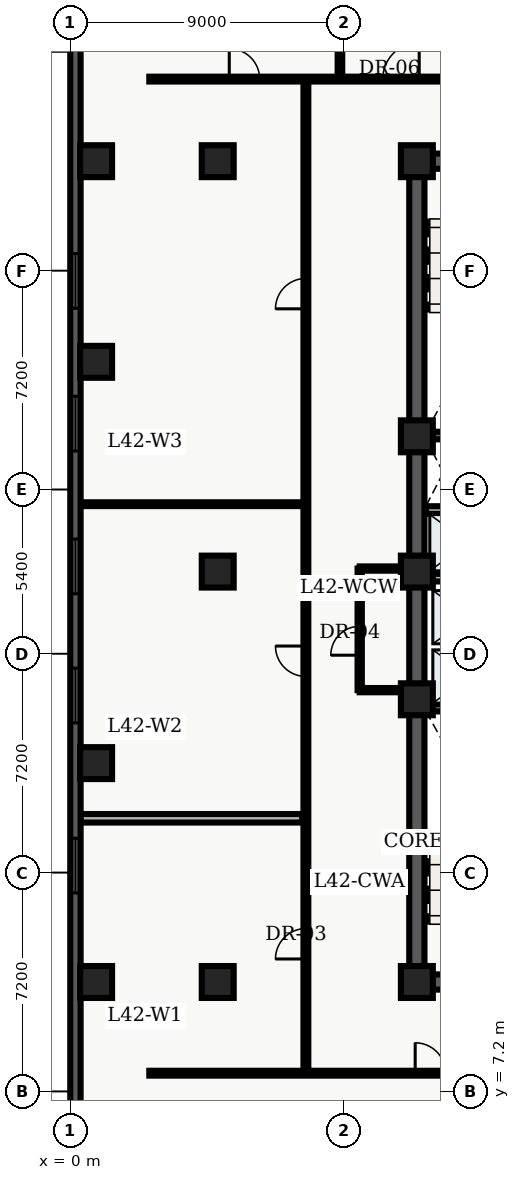
"""IFC4 building model, lengths in metres.
Left out: names, types, materials, properties, quantities, classifications, styles, units other than length and angle.
Written with IfcOpenShell. Run it as: python <this file> out.ifc"""

import sys

from ifc_helpers import new_model, entity, si_unit, converted_unit, direction, frame, origin_with_axes, origin_2d_with_axis, place, context, subcontext, project, spatial, polyline, rectangle, outline, extrude, element, fill, save


model = new_model("IFC4")
c1 = context("Model", 3, precision=1e-05, world=origin_with_axes(), true_north=direction((0.0, 1.0)))
c2 = subcontext(c1, "Body", "Model", "MODEL_VIEW")
j1 = project(units=[si_unit("LENGTHUNIT", "METRE"), converted_unit("PLANEANGLEUNIT", "DEGREE", entity("IfcPlaneAngleMeasure", 0.017), si_unit("PLANEANGLEUNIT", "RADIAN"), dimensions=[0, 0, 0, 0, 0, 0, 0])], contexts=[c1])
p1 = place(None, origin_with_axes())
s1 = spatial("IfcSite", under=j1, at=p1, CompositionType="ELEMENT")
p2 = place(p1, origin_with_axes())
s2 = spatial("IfcBuilding", under=s1, at=p2, CompositionType="ELEMENT")
p3 = place(p2, frame((0.0, 0.0, 171.9), z_axis=(0.0, 0.0, 1.0), x_axis=(1.0, 0.0, 0.0)))
s3 = spatial("IfcBuildingStorey", under=s2, at=p3, CompositionType="ELEMENT", Elevation=171.9)
p4 = place(p3, frame((11.4, 10.8, 0.0), z_axis=(0.0, 0.0, 1.0), x_axis=(0.0, 1.0, 0.0)))
e1 = element("IfcWall", 1, at=p4, inside=s3, PredefinedType="SHEAR", context=c2, shape_type="SweptSolid", body=[
    extrude(outline(polyline([(0.0, -0.25), (27.0, -0.25), (27.0, 0.25), (0.0, 0.25), (0.0, -0.25)])), origin_with_axes(), (0.0, 0.0, 1.0), 3.66),
])
p5 = place(p3, frame((11.4, 10.8, 0.0), z_axis=(0.0, 0.0, 1.0), x_axis=(1.0, 0.0, 0.0)))
e2 = element("IfcWall", 2, at=p5, inside=s3, PredefinedType="SHEAR", context=c2, shape_type="SweptSolid", body=[
    extrude(outline(polyline([(0.0, -0.25), (7.2, -0.25), (7.2, 0.25), (0.0, 0.25), (0.0, -0.25)])), origin_with_axes(), (0.0, 0.0, 1.0), 3.66),
])
p6 = place(p5, frame((2.625, 0.0, 0.0), z_axis=(0.0, 0.0, 1.0), x_axis=(1.0, 0.0, 0.0)))
e3 = element("IfcOpeningElement", 3, at=p6, cuts=e2, PredefinedType="OPENING", context=c2, shape_type="SweptSolid", body=[
    extrude(rectangle(XDim=1.05, YDim=0.52, at=origin_2d_with_axis()), origin_with_axes(), (0.0, 0.0, 1.0), 2.15),
])
p7 = place(p3, frame((11.4, 37.8, 0.0), z_axis=(0.0, 0.0, 1.0), x_axis=(1.0, 0.0, 0.0)))
e4 = element("IfcWall", 4, at=p7, inside=s3, PredefinedType="SHEAR", context=c2, shape_type="SweptSolid", body=[
    extrude(outline(polyline([(0.0, -0.25), (7.2, -0.25), (7.2, 0.25), (0.0, 0.25), (0.0, -0.25)])), origin_with_axes(), (0.0, 0.0, 1.0), 3.66),
])
p8 = place(p7, frame((2.625, 0.0, 0.0), z_axis=(0.0, 0.0, 1.0), x_axis=(1.0, 0.0, 0.0)))
e5 = element("IfcOpeningElement", 5, at=p8, cuts=e4, PredefinedType="OPENING", context=c2, shape_type="SweptSolid", body=[
    extrude(rectangle(XDim=1.05, YDim=0.52, at=origin_2d_with_axis()), origin_with_axes(), (0.0, 0.0, 1.0), 2.15),
])
for number, where, z_axis, x_axis in (
    (6, (11.65, 19.825, 0.0), (0.0, 0.0, 1.0), (1.0, 0.0, 0.0)),
    (7, (11.65, 28.775, 0.0), (0.0, 0.0, 1.0), (1.0, 0.0, 0.0)),
):
    element("IfcWall", number, at=place(p3, frame(where, z_axis=z_axis, x_axis=x_axis)), inside=s3, PredefinedType="SHEAR", context=c2, shape_type="SweptSolid", body=[
        extrude(outline(polyline([(0.0, -0.125), (6.7, -0.125), (6.7, 0.125), (0.0, 0.125), (0.0, -0.125)])), origin_with_axes(), (0.0, 0.0, 1.0), 3.66),
    ])
p9 = place(p3, frame((11.7, 24.1, 0.0), z_axis=(0.0, 0.0, 1.0), x_axis=(1.0, 0.0, 0.0)))
e8 = element("IfcWall", 8, at=p9, inside=s3, PredefinedType="SOLIDWALL", context=c2, shape_type="SweptSolid", body=[
    extrude(outline(polyline([(0.0, -0.125), (6.6, -0.125), (6.6, 0.125), (0.0, 0.125), (0.0, -0.125)])), origin_with_axes(), (0.0, 0.0, 1.0), 2.7),
])
p10 = place(p9, frame((3.6, 0.0, 0.0), z_axis=(0.0, 0.0, 1.0), x_axis=(1.0, 0.0, 0.0)))
e9 = element("IfcOpeningElement", 9, at=p10, cuts=e8, PredefinedType="OPENING", context=c2, shape_type="SweptSolid", body=[
    extrude(rectangle(XDim=0.9, YDim=0.27, at=origin_2d_with_axis()), origin_with_axes(), (0.0, 0.0, 1.0), 2.15),
])
p11 = place(p9, frame((5.65, 0.0, 0.0), z_axis=(0.0, 0.0, 1.0), x_axis=(1.0, 0.0, 0.0)))
e10 = element("IfcOpeningElement", 10, at=p11, cuts=e8, PredefinedType="OPENING", context=c2, shape_type="SweptSolid", body=[
    extrude(rectangle(XDim=0.9, YDim=0.27, at=origin_2d_with_axis()), origin_with_axes(), (0.0, 0.0, 1.0), 2.15),
])
p12 = place(p3, frame((11.7, 26.325, 0.0), z_axis=(0.0, 0.0, 1.0), x_axis=(1.0, 0.0, 0.0)))
e11 = element("IfcWall", 11, at=p12, inside=s3, PredefinedType="SOLIDWALL", context=c2, shape_type="SweptSolid", body=[
    extrude(outline(polyline([(0.0, -0.125), (6.6, -0.125), (6.6, 0.125), (0.0, 0.125), (0.0, -0.125)])), origin_with_axes(), (0.0, 0.0, 1.0), 2.7),
])
p13 = place(p12, frame((3.5, 0.0, 0.0), z_axis=(0.0, 0.0, 1.0), x_axis=(1.0, 0.0, 0.0)))
e12 = element("IfcOpeningElement", 12, at=p13, cuts=e11, PredefinedType="OPENING", context=c2, shape_type="SweptSolid", body=[
    extrude(rectangle(XDim=0.9, YDim=0.27, at=origin_2d_with_axis()), origin_with_axes(), (0.0, 0.0, 1.0), 2.15),
])
for number, where, z_axis, x_axis in (
    (13, (11.4, 10.8, 0.0), (0.0, 0.0, 1.0), (1.0, 0.0, 0.0)),
    (14, (11.4, 20.1, 0.0), (0.0, 0.0, 1.0), (1.0, 0.0, 0.0)),
    (15, (11.4, 24.3, 0.0), (0.0, 0.0, 1.0), (1.0, 0.0, 0.0)),
    (16, (11.4, 28.75, 0.0), (0.0, 0.0, 1.0), (1.0, 0.0, 0.0)),
    (17, (11.4, 37.8, 0.0), (0.0, 0.0, 1.0), (1.0, 0.0, 0.0)),
    (18, (4.85, 10.8, 0.0), (0.0, 0.0, 1.0), (1.0, 0.0, 0.0)),
    (19, (4.85, 24.3, 0.0), (0.0, 0.0, 1.0), (1.0, 0.0, 0.0)),
    (20, (4.85, 37.8, 0.0), (0.0, 0.0, 1.0), (1.0, 0.0, 0.0)),
    (21, (0.85, 10.8, 0.0), (0.0, 0.0, 1.0), (1.0, 0.0, 0.0)),
    (22, (0.85, 18.0, 0.0), (0.0, 0.0, 1.0), (1.0, 0.0, 0.0)),
    (23, (0.85, 31.2, 0.0), (0.0, 0.0, 1.0), (1.0, 0.0, 0.0)),
    (24, (0.85, 37.8, 0.0), (0.0, 0.0, 1.0), (1.0, 0.0, 0.0)),
):
    element("IfcColumn", number, at=place(p3, frame(where, z_axis=z_axis, x_axis=x_axis)), inside=s3, PredefinedType="COLUMN", context=c2, shape_type="SweptSolid", body=[
        extrude(rectangle(XDim=1.05, YDim=1.05, at=origin_2d_with_axis()), origin_with_axes(), (0.0, 0.0, 1.0), 3.9),
    ])
p14 = place(p3, frame((9.52, 20.4, 0.0), z_axis=(0.0, 0.0, 1.0), x_axis=(0.0, 1.0, 0.0)))
e25 = element("IfcWall", 25, at=p14, inside=s3, PredefinedType="PARTITIONING", context=c2, shape_type="SweptSolid", body=[
    extrude(outline(polyline([(0.0, -0.07), (4.0, -0.07), (4.0, 0.07), (0.0, 0.07), (0.0, -0.07)])), origin_with_axes(), (0.0, 0.0, 1.0), 2.7),
])
p15 = place(p14, frame((1.625, 0.0, 0.0), z_axis=(0.0, 0.0, 1.0), x_axis=(1.0, 0.0, 0.0)))
e26 = element("IfcOpeningElement", 26, at=p15, cuts=e25, PredefinedType="OPENING", context=c2, shape_type="SweptSolid", body=[
    extrude(rectangle(XDim=0.95, YDim=0.16, at=origin_2d_with_axis()), origin_with_axes(), (0.0, 0.0, 1.0), 2.15),
])
for number, where, z_axis, x_axis in (
    (27, (9.52, 20.4, 0.0), (0.0, 0.0, 1.0), (1.0, 0.0, 0.0)),
    (28, (9.52, 24.4, 0.0), (0.0, 0.0, 1.0), (1.0, 0.0, 0.0)),
):
    element("IfcWall", number, at=place(p3, frame(where, z_axis=z_axis, x_axis=x_axis)), inside=s3, PredefinedType="PARTITIONING", context=c2, shape_type="SweptSolid", body=[
        extrude(outline(polyline([(0.0, -0.07), (1.58, -0.07), (1.58, 0.07), (0.0, 0.07), (0.0, -0.07)])), origin_with_axes(), (0.0, 0.0, 1.0), 2.7),
    ])
p16 = place(p3, frame((2.6, 7.8, 0.0), z_axis=(0.0, 0.0, 1.0), x_axis=(1.0, 0.0, 0.0)))
e29 = element("IfcWall", 29, at=p16, inside=s3, PredefinedType="PARTITIONING", context=c2, shape_type="SweptSolid", body=[
    extrude(outline(polyline([(0.0, -0.08), (18.55, -0.08), (18.55, 0.08), (0.0, 0.08), (0.0, -0.08)])), origin_with_axes(), (0.0, 0.0, 1.0), 2.7),
])
p17 = place(p16, frame((9.245, 0.0, 0.0), z_axis=(0.0, 0.0, 1.0), x_axis=(1.0, 0.0, 0.0)))
e30 = element("IfcOpeningElement", 30, at=p17, cuts=e29, PredefinedType="OPENING", context=c2, shape_type="SweptSolid", body=[
    extrude(rectangle(XDim=1.0, YDim=0.18, at=origin_2d_with_axis()), origin_with_axes(), (0.0, 0.0, 1.0), 2.15),
])
p18 = place(p3, frame((2.6, 40.5, 0.0), z_axis=(0.0, 0.0, 1.0), x_axis=(1.0, 0.0, 0.0)))
e31 = element("IfcWall", 31, at=p18, inside=s3, PredefinedType="PARTITIONING", context=c2, shape_type="SweptSolid", body=[
    extrude(outline(polyline([(0.0, -0.08), (21.803, -0.08), (21.803, 0.08), (0.0, 0.08), (0.0, -0.08)])), origin_with_axes(), (0.0, 0.0, 1.0), 2.7),
])
p19 = place(p18, frame((3.13, 0.0, 0.0), z_axis=(0.0, 0.0, 1.0), x_axis=(1.0, 0.0, 0.0)))
e32 = element("IfcOpeningElement", 32, at=p19, cuts=e31, PredefinedType="OPENING", context=c2, shape_type="SweptSolid", body=[
    extrude(rectangle(XDim=1.0, YDim=0.18, at=origin_2d_with_axis()), origin_with_axes(), (0.0, 0.0, 1.0), 2.15),
])
p20 = place(p18, frame((8.277, 0.0, 0.0), z_axis=(0.0, 0.0, 1.0), x_axis=(1.0, 0.0, 0.0)))
e33 = element("IfcOpeningElement", 33, at=p20, cuts=e31, PredefinedType="OPENING", context=c2, shape_type="SweptSolid", body=[
    extrude(rectangle(XDim=1.2, YDim=0.18, at=origin_2d_with_axis()), origin_with_axes(), (0.0, 0.0, 1.0), 2.2),
])
p21 = place(p18, frame((15.553, 0.0, 0.0), z_axis=(0.0, 0.0, 1.0), x_axis=(1.0, 0.0, 0.0)))
e34 = element("IfcOpeningElement", 34, at=p21, cuts=e31, PredefinedType="OPENING", context=c2, shape_type="SweptSolid", body=[
    extrude(rectangle(XDim=1.0, YDim=0.18, at=origin_2d_with_axis()), origin_with_axes(), (0.0, 0.0, 1.0), 2.15),
])
p22 = place(p3, frame((7.75, 7.8, 0.0), z_axis=(0.0, 0.0, 1.0), x_axis=(0.0, 1.0, 0.0)))
e35 = element("IfcWall", 35, at=p22, inside=s3, PredefinedType="PARTITIONING", context=c2, shape_type="SweptSolid", body=[
    extrude(outline(polyline([(0.0, -0.08), (32.7, -0.08), (32.7, 0.08), (0.0, 0.08), (0.0, -0.08)])), origin_with_axes(), (0.0, 0.0, 1.0), 2.7),
])
p23 = place(p22, frame((4.258, 0.0, 0.0), z_axis=(0.0, 0.0, 1.0), x_axis=(1.0, 0.0, 0.0)))
e36 = element("IfcOpeningElement", 36, at=p23, cuts=e35, PredefinedType="OPENING", context=c2, shape_type="SweptSolid", body=[
    extrude(rectangle(XDim=1.0, YDim=0.18, at=origin_2d_with_axis()), origin_with_axes(), (0.0, 0.0, 1.0), 2.15),
])
p24 = place(p22, frame((13.551, 0.0, 0.0), z_axis=(0.0, 0.0, 1.0), x_axis=(1.0, 0.0, 0.0)))
e37 = element("IfcOpeningElement", 37, at=p24, cuts=e35, PredefinedType="OPENING", context=c2, shape_type="SweptSolid", body=[
    extrude(rectangle(XDim=1.0, YDim=0.18, at=origin_2d_with_axis()), origin_with_axes(), (0.0, 0.0, 1.0), 2.15),
])
p25 = place(p22, frame((25.643, 0.0, 0.0), z_axis=(0.0, 0.0, 1.0), x_axis=(1.0, 0.0, 0.0)))
e38 = element("IfcOpeningElement", 38, at=p25, cuts=e35, PredefinedType="OPENING", context=c2, shape_type="SweptSolid", body=[
    extrude(rectangle(XDim=1.0, YDim=0.18, at=origin_2d_with_axis()), origin_with_axes(), (0.0, 0.0, 1.0), 2.15),
])
p26 = place(p3, frame((0.335, 16.185, 0.0), z_axis=(0.0, 0.0, 1.0), x_axis=(1.0, 0.0, 0.0)))
e39 = element("IfcWall", 39, at=p26, inside=s3, PredefinedType="PARTITIONING", context=c2, shape_type="SweptSolid", body=[
    extrude(outline(polyline([(0.0, -0.14), (7.295, -0.14), (7.295, 0.14), (0.0, 0.14), (0.0, -0.14)])), origin_with_axes(), (0.0, 0.0, 1.0), 2.7),
])
p27 = place(p3, frame((0.335, 26.517, 0.0), z_axis=(0.0, 0.0, 1.0), x_axis=(1.0, 0.0, 0.0)))
e40 = element("IfcWall", 40, at=p27, inside=s3, PredefinedType="PARTITIONING", context=c2, shape_type="SweptSolid", body=[
    extrude(outline(polyline([(0.0, -0.062), (7.295, -0.062), (7.295, 0.062), (0.0, 0.062), (0.0, -0.062)])), origin_with_axes(), (0.0, 0.0, 1.0), 2.7),
])
p28 = place(p3, frame((8.87, 40.6, 0.0), z_axis=(0.0, 0.0, 1.0), x_axis=(0.0, 1.0, 0.0)))
e41 = element("IfcWall", 41, at=p28, inside=s3, PredefinedType="PARTITIONING", context=c2, shape_type="SweptSolid", body=[
    extrude(outline(polyline([(0.0, -0.075), (7.665, -0.075), (7.665, 0.075), (0.0, 0.075), (0.0, -0.075)])), origin_with_axes(), (0.0, 0.0, 1.0), 2.7),
])
p29 = place(p3, frame((0.17, 2.74, 0.0), z_axis=(0.0, 0.0, 1.0), x_axis=(0.0, 1.0, 0.0)))
e42 = element("IfcWall", 42, at=p29, inside=s3, PredefinedType="SOLIDWALL", context=c2, shape_type="SweptSolid", body=[
    extrude(outline(polyline([(0.0, -0.17), (43.46, -0.17), (43.46, 0.17), (0.0, 0.17), (0.0, -0.17)])), origin_with_axes(), (0.0, 0.0, 1.0), 3.66),
])
p30 = place(p29, frame((2.948, 0.0, 0.45), z_axis=(0.0, 0.0, 1.0), x_axis=(1.0, 0.0, 0.0)))
e43 = element("IfcOpeningElement", 43, at=p30, cuts=e42, PredefinedType="OPENING", context=c2, shape_type="SweptSolid", body=[
    extrude(rectangle(XDim=1.8, YDim=0.36, at=origin_2d_with_axis()), origin_with_axes(), (0.0, 0.0, 1.0), 2.1),
])
p31 = place(p29, frame((11.889, 0.0, 0.45), z_axis=(0.0, 0.0, 1.0), x_axis=(1.0, 0.0, 0.0)))
e44 = element("IfcOpeningElement", 44, at=p31, cuts=e42, PredefinedType="OPENING", context=c2, shape_type="SweptSolid", body=[
    extrude(rectangle(XDim=1.8, YDim=0.36, at=origin_2d_with_axis()), origin_with_axes(), (0.0, 0.0, 1.0), 2.1),
])
p32 = place(p29, frame((17.484, 0.0, 0.45), z_axis=(0.0, 0.0, 1.0), x_axis=(1.0, 0.0, 0.0)))
e45 = element("IfcOpeningElement", 45, at=p32, cuts=e42, PredefinedType="OPENING", context=c2, shape_type="SweptSolid", body=[
    extrude(rectangle(XDim=1.8, YDim=0.36, at=origin_2d_with_axis()), origin_with_axes(), (0.0, 0.0, 1.0), 2.1),
])
p33 = place(p29, frame((21.73, 0.0, 0.45), z_axis=(0.0, 0.0, 1.0), x_axis=(1.0, 0.0, 0.0)))
e46 = element("IfcOpeningElement", 46, at=p33, cuts=e42, PredefinedType="OPENING", context=c2, shape_type="SweptSolid", body=[
    extrude(rectangle(XDim=1.8, YDim=0.36, at=origin_2d_with_axis()), origin_with_axes(), (0.0, 0.0, 1.0), 2.1),
])
p34 = place(p29, frame((26.426, 0.0, 0.45), z_axis=(0.0, 0.0, 1.0), x_axis=(1.0, 0.0, 0.0)))
e47 = element("IfcOpeningElement", 47, at=p34, cuts=e42, PredefinedType="OPENING", context=c2, shape_type="SweptSolid", body=[
    extrude(rectangle(XDim=1.8, YDim=0.36, at=origin_2d_with_axis()), origin_with_axes(), (0.0, 0.0, 1.0), 2.1),
])
p35 = place(p29, frame((31.121, 0.0, 0.45), z_axis=(0.0, 0.0, 1.0), x_axis=(1.0, 0.0, 0.0)))
e48 = element("IfcOpeningElement", 48, at=p35, cuts=e42, PredefinedType="OPENING", context=c2, shape_type="SweptSolid", body=[
    extrude(rectangle(XDim=1.8, YDim=0.36, at=origin_2d_with_axis()), origin_with_axes(), (0.0, 0.0, 1.0), 2.1),
])
p36 = place(p29, frame((40.062, 0.0, 0.45), z_axis=(0.0, 0.0, 1.0), x_axis=(1.0, 0.0, 0.0)))
e49 = element("IfcOpeningElement", 49, at=p36, cuts=e42, PredefinedType="OPENING", context=c2, shape_type="SweptSolid", body=[
    extrude(rectangle(XDim=1.8, YDim=0.36, at=origin_2d_with_axis()), origin_with_axes(), (0.0, 0.0, 1.0), 2.1),
])
p37 = place(p14, frame((1.625, 0.0, 0.0), z_axis=(0.0, 0.0, 1.0), x_axis=(1.0, 0.0, 0.0)))
e50 = element("IfcDoor", 50, at=p37, inside=s3, OperationType="SINGLE_SWING_LEFT", PredefinedType="DOOR", context=c2, shape_type="SweptSolid", body=[
    extrude(rectangle(XDim=0.95, YDim=0.084, at=origin_2d_with_axis()), origin_with_axes(), (0.0, 0.0, 1.0), 2.15),
])
fill(e26, e50)
p38 = place(p22, frame((4.258, 0.0, 0.0), z_axis=(0.0, 0.0, 1.0), x_axis=(1.0, 0.0, 0.0)))
e51 = element("IfcDoor", 51, at=p38, inside=s3, OperationType="SINGLE_SWING_LEFT", PredefinedType="DOOR", context=c2, shape_type="SweptSolid", body=[
    extrude(rectangle(XDim=1.0, YDim=0.09, at=origin_2d_with_axis()), origin_with_axes(), (0.0, 0.0, 1.0), 2.15),
])
fill(e36, e51)
p39 = place(p22, frame((13.551, 0.0, 0.0), z_axis=(0.0, 0.0, 1.0), x_axis=(1.0, 0.0, 0.0)))
e52 = element("IfcDoor", 52, at=p39, inside=s3, OperationType="SINGLE_SWING_RIGHT", PredefinedType="DOOR", context=c2, shape_type="SweptSolid", body=[
    extrude(rectangle(XDim=1.0, YDim=0.09, at=origin_2d_with_axis()), origin_with_axes(), (0.0, 0.0, 1.0), 2.15),
])
fill(e37, e52)
p40 = place(p22, frame((25.643, 0.0, 0.0), z_axis=(0.0, 0.0, 1.0), x_axis=(1.0, 0.0, 0.0)))
e53 = element("IfcDoor", 53, at=p40, inside=s3, OperationType="SINGLE_SWING_LEFT", PredefinedType="DOOR", context=c2, shape_type="SweptSolid", body=[
    extrude(rectangle(XDim=1.0, YDim=0.09, at=origin_2d_with_axis()), origin_with_axes(), (0.0, 0.0, 1.0), 2.15),
])
fill(e38, e53)
p41 = place(p16, frame((9.245, 0.0, 0.0), z_axis=(0.0, 0.0, 1.0), x_axis=(1.0, 0.0, 0.0)))
e54 = element("IfcDoor", 54, at=p41, inside=s3, OperationType="SINGLE_SWING_LEFT", PredefinedType="DOOR", context=c2, shape_type="SweptSolid", body=[
    extrude(rectangle(XDim=1.0, YDim=0.09, at=origin_2d_with_axis()), origin_with_axes(), (0.0, 0.0, 1.0), 2.15),
])
fill(e30, e54)
p42 = place(p18, frame((3.13, 0.0, 0.0), z_axis=(0.0, 0.0, 1.0), x_axis=(1.0, 0.0, 0.0)))
e55 = element("IfcDoor", 55, at=p42, inside=s3, OperationType="SINGLE_SWING_LEFT", PredefinedType="DOOR", context=c2, shape_type="SweptSolid", body=[
    extrude(rectangle(XDim=1.0, YDim=0.09, at=origin_2d_with_axis()), origin_with_axes(), (0.0, 0.0, 1.0), 2.15),
])
fill(e32, e55)
p43 = place(p18, frame((8.277, 0.0, 0.0), z_axis=(0.0, 0.0, 1.0), x_axis=(1.0, 0.0, 0.0)))
e56 = element("IfcDoor", 56, at=p43, inside=s3, OperationType="SINGLE_SWING_RIGHT", PredefinedType="DOOR", context=c2, shape_type="SweptSolid", body=[
    extrude(rectangle(XDim=1.2, YDim=0.09, at=origin_2d_with_axis()), origin_with_axes(), (0.0, 0.0, 1.0), 2.2),
])
fill(e33, e56)
p44 = place(p29, frame((11.889, 0.0, 0.45), z_axis=(0.0, 0.0, 1.0), x_axis=(1.0, 0.0, 0.0)))
e57 = element("IfcWindow", 57, at=p44, inside=s3, PredefinedType="WINDOW", context=c2, shape_type="SweptSolid", body=[
    extrude(rectangle(XDim=1.8, YDim=0.09, at=origin_2d_with_axis()), origin_with_axes(), (0.0, 0.0, 1.0), 2.1),
])
fill(e44, e57)
p45 = place(p29, frame((17.484, 0.0, 0.45), z_axis=(0.0, 0.0, 1.0), x_axis=(1.0, 0.0, 0.0)))
e58 = element("IfcWindow", 58, at=p45, inside=s3, PredefinedType="WINDOW", context=c2, shape_type="SweptSolid", body=[
    extrude(rectangle(XDim=1.8, YDim=0.09, at=origin_2d_with_axis()), origin_with_axes(), (0.0, 0.0, 1.0), 2.1),
])
fill(e45, e58)
p46 = place(p29, frame((21.73, 0.0, 0.45), z_axis=(0.0, 0.0, 1.0), x_axis=(1.0, 0.0, 0.0)))
e59 = element("IfcWindow", 59, at=p46, inside=s3, PredefinedType="WINDOW", context=c2, shape_type="SweptSolid", body=[
    extrude(rectangle(XDim=1.8, YDim=0.09, at=origin_2d_with_axis()), origin_with_axes(), (0.0, 0.0, 1.0), 2.1),
])
fill(e46, e59)
p47 = place(p29, frame((26.426, 0.0, 0.45), z_axis=(0.0, 0.0, 1.0), x_axis=(1.0, 0.0, 0.0)))
e60 = element("IfcWindow", 60, at=p47, inside=s3, PredefinedType="WINDOW", context=c2, shape_type="SweptSolid", body=[
    extrude(rectangle(XDim=1.8, YDim=0.09, at=origin_2d_with_axis()), origin_with_axes(), (0.0, 0.0, 1.0), 2.1),
])
fill(e47, e60)
p48 = place(p29, frame((31.121, 0.0, 0.45), z_axis=(0.0, 0.0, 1.0), x_axis=(1.0, 0.0, 0.0)))
e61 = element("IfcWindow", 61, at=p48, inside=s3, PredefinedType="WINDOW", context=c2, shape_type="SweptSolid", body=[
    extrude(rectangle(XDim=1.8, YDim=0.09, at=origin_2d_with_axis()), origin_with_axes(), (0.0, 0.0, 1.0), 2.1),
])
fill(e48, e61)
save(model, sys.argv[1])
